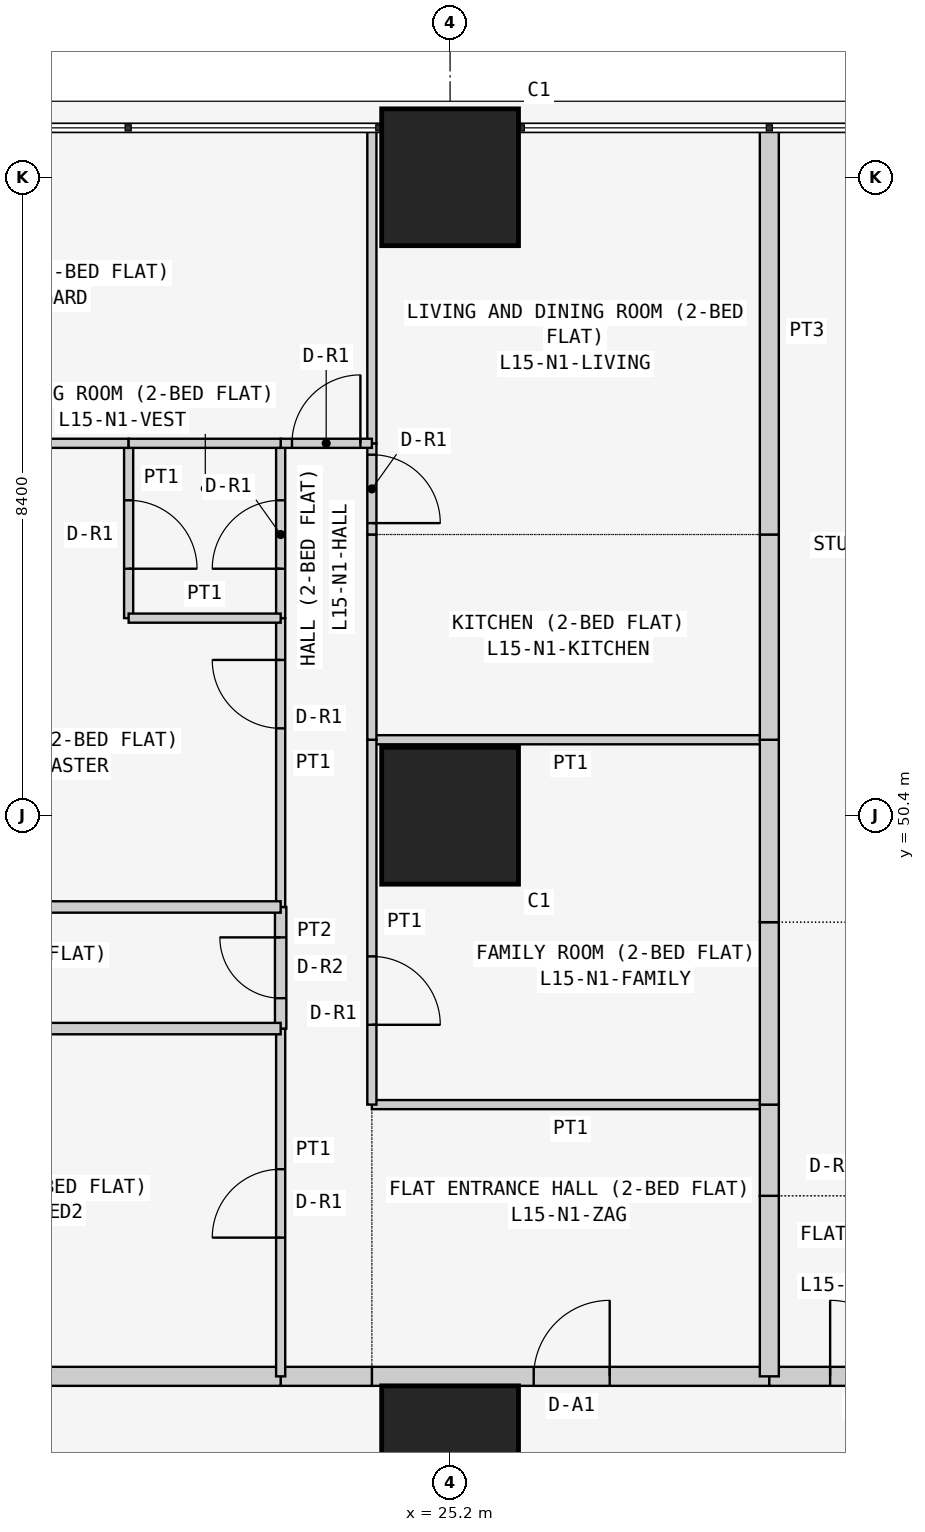
"""IFC4 building model, lengths in metres.
Left out: names, types, materials, properties, quantities, classifications, styles, units other than length and angle.
Written with IfcOpenShell. Run it as: python <this file> out.ifc"""

import sys

from ifc_helpers import new_model, si_unit, direction, frame, frame_2d, origin, origin_2d, place, context, subcontext, project, spatial, rectangle, extrude, element, fill, save


model = new_model("IFC4")
c1 = context("Model", 3, precision=1e-05, world=origin(), true_north=direction((0.0, 1.0)))
c2 = subcontext(c1, "Body", "Model", "MODEL_VIEW")
j1 = project(units=[si_unit("LENGTHUNIT", "METRE"), si_unit("PLANEANGLEUNIT", "RADIAN")], contexts=[c1])
p1 = place(None, origin())
s1 = spatial("IfcSite", under=j1, at=p1, CompositionType="ELEMENT")
p2 = place(p1, origin())
s2 = spatial("IfcBuilding", under=s1, at=p2, CompositionType="ELEMENT")
p3 = place(p2, frame((0.0, 0.0, 63.3)))
s3 = spatial("IfcBuildingStorey", under=s2, at=p3, CompositionType="ELEMENT", Elevation=63.3)
for number, where, z_axis, x_axis in (
    (1, (25.2, 42.0, 0.0), (0.0, 0.0, 1.0), (1.0, 0.0, 0.0)),
    (2, (25.2, 50.4, 0.0), (0.0, 0.0, 1.0), (1.0, 0.0, 0.0)),
    (3, (25.2, 58.8, 0.0), (0.0, 0.0, 1.0), (1.0, 0.0, 0.0)),
):
    element("IfcColumn", number, at=place(p3, frame(where, z_axis=z_axis, x_axis=x_axis)), inside=s3, PredefinedType="COLUMN", context=c2, shape_type="SweptSolid", body=[
        extrude(rectangle(XDim=1.8, YDim=1.8, at=origin_2d()), origin(), (0.0, 0.0, 1.0), 3.6),
    ])
p4 = place(p3, frame((24.171, 43.025, 0.0), z_axis=(0.0, 0.0, 1.0), x_axis=(1.0, 0.0, 0.0)))
e4 = element("IfcWall", 4, at=p4, inside=s3, PredefinedType="PARTITIONING", context=c2, shape_type="SweptSolid", body=[
    extrude(rectangle(XDim=5.229, YDim=0.25, at=frame_2d((2.615, 0.0))), origin(), (0.0, 0.0, 1.0), 3.45),
])
p5 = place(p4, frame((2.129, 0.0, 0.0)))
e5 = element("IfcOpeningElement", 5, at=p5, cuts=e4, PredefinedType="OPENING", context=c2, shape_type="SweptSolid", body=[
    extrude(rectangle(XDim=1.0, YDim=2.1, at=frame_2d((0.5, 1.05))), frame((0.0, 0.135, 0.0), z_axis=(0.0, -1.0, 0.0), x_axis=(1.0, 0.0, 0.0)), (0.0, 0.0, 1.0), 0.27),
])
p6 = place(p3, frame((22.971, 43.025, 0.0), z_axis=(0.0, 0.0, 1.0), x_axis=(1.0, 0.0, 0.0)))
e6 = element("IfcWall", 6, at=p6, inside=s3, PredefinedType="PARTITIONING", context=c2, shape_type="SweptSolid", body=[
    extrude(rectangle(XDim=1.2, YDim=0.25, at=frame_2d((0.6, 0.0))), origin(), (0.0, 0.0, 1.0), 3.45),
])
p7 = place(p3, frame((16.1, 43.025, 0.0), z_axis=(0.0, 0.0, 1.0), x_axis=(1.0, 0.0, 0.0)))
e7 = element("IfcWall", 7, at=p7, inside=s3, PredefinedType="PARTITIONING", context=c2, shape_type="SweptSolid", body=[
    extrude(rectangle(XDim=6.871, YDim=0.25, at=frame_2d((3.436, 0.0))), origin(), (0.0, 0.0, 1.0), 3.45),
])
p8 = place(p3, frame((29.4, 43.025, 0.0), z_axis=(0.0, 0.0, 1.0), x_axis=(1.0, 0.0, 0.0)))
e8 = element("IfcWall", 8, at=p8, inside=s3, PredefinedType="PARTITIONING", context=c2, shape_type="SweptSolid", body=[
    extrude(rectangle(XDim=2.6, YDim=0.25, at=frame_2d((1.3, 0.0))), origin(), (0.0, 0.0, 1.0), 3.45),
])
p9 = place(p8, frame((0.8, 0.0, 0.0)))
e9 = element("IfcOpeningElement", 9, at=p9, cuts=e8, PredefinedType="OPENING", context=c2, shape_type="SweptSolid", body=[
    extrude(rectangle(XDim=1.0, YDim=2.1, at=frame_2d((0.5, 1.05))), frame((0.0, 0.135, 0.0), z_axis=(0.0, -1.0, 0.0), x_axis=(1.0, 0.0, 0.0)), (0.0, 0.0, 1.0), 0.27),
])
p10 = place(p3, frame((29.4, 46.6, 0.0), z_axis=(0.0, 0.0, 1.0), x_axis=(-1.0, 0.0, 0.0)))
e10 = element("IfcWall", 10, at=p10, inside=s3, PredefinedType="PARTITIONING", context=c2, shape_type="SweptSolid", body=[
    extrude(rectangle(XDim=5.229, YDim=0.12, at=frame_2d((2.615, 0.0))), origin(), (0.0, 0.0, 1.0), 3.45),
])
p11 = place(p3, frame((29.4, 43.025, 0.0), z_axis=(0.0, 0.0, 1.0), x_axis=(0.0, 1.0, 0.0)))
e11 = element("IfcWall", 11, at=p11, inside=s3, PredefinedType="PARTITIONING", context=c2, shape_type="SweptSolid", body=[
    extrude(rectangle(XDim=2.375, YDim=0.25, at=frame_2d((1.188, 0.0))), origin(), (0.0, 0.0, 1.0), 2.848),
])
p12 = place(p3, frame((29.4, 45.4, 0.0), z_axis=(0.0, 0.0, 1.0), x_axis=(0.0, 1.0, 0.0)))
e12 = element("IfcWall", 12, at=p12, inside=s3, PredefinedType="PARTITIONING", context=c2, shape_type="SweptSolid", body=[
    extrude(rectangle(XDim=1.2, YDim=0.25, at=frame_2d((0.6, 0.0))), origin(), (0.0, 0.0, 1.0), 2.848),
])
p13 = place(p3, frame((29.4, 51.4, 0.0), z_axis=(0.0, 0.0, 1.0), x_axis=(-1.0, 0.0, 0.0)))
e13 = element("IfcWall", 13, at=p13, inside=s3, PredefinedType="PARTITIONING", context=c2, shape_type="SweptSolid", body=[
    extrude(rectangle(XDim=5.229, YDim=0.12, at=frame_2d((2.615, 0.0))), origin(), (0.0, 0.0, 1.0), 3.45),
])
p14 = place(p3, frame((24.171, 51.4, 0.0), z_axis=(0.0, 0.0, 1.0), x_axis=(0.0, -1.0, 0.0)))
e14 = element("IfcWall", 14, at=p14, inside=s3, PredefinedType="PARTITIONING", context=c2, shape_type="SweptSolid", body=[
    extrude(rectangle(XDim=4.8, YDim=0.12, at=frame_2d((2.4, 0.0))), origin(), (0.0, 0.0, 1.0), 3.45),
])
p15 = place(p14, frame((2.85, 0.0, 0.0)))
e15 = element("IfcOpeningElement", 15, at=p15, cuts=e14, PredefinedType="OPENING", context=c2, shape_type="SweptSolid", body=[
    extrude(rectangle(XDim=0.9, YDim=2.1, at=frame_2d((0.45, 1.05))), frame((0.0, 0.07, 0.0), z_axis=(0.0, -1.0, 0.0), x_axis=(1.0, 0.0, 0.0)), (0.0, 0.0, 1.0), 0.14),
])
for number, where, z_axis, x_axis in (
    (16, (29.4, 46.6, 0.0), (0.0, 0.0, 1.0), (0.0, 1.0, 0.0)),
    (17, (29.4, 49.0, 0.0), (0.0, 0.0, 1.0), (0.0, 1.0, 0.0)),
):
    element("IfcWall", number, at=place(p3, frame(where, z_axis=z_axis, x_axis=x_axis)), inside=s3, PredefinedType="PARTITIONING", context=c2, shape_type="SweptSolid", body=[
        extrude(rectangle(XDim=2.4, YDim=0.25, at=frame_2d((1.2, 0.0))), origin(), (0.0, 0.0, 1.0), 2.848),
    ])
p16 = place(p3, frame((24.171, 54.1, 0.0), z_axis=(0.0, 0.0, 1.0), x_axis=(0.0, -1.0, 0.0)))
e18 = element("IfcWall", 18, at=p16, inside=s3, PredefinedType="PARTITIONING", context=c2, shape_type="SweptSolid", body=[
    extrude(rectangle(XDim=2.7, YDim=0.12, at=frame_2d((1.35, 0.0))), origin(), (0.0, 0.0, 1.0), 3.45),
])
p17 = place(p3, frame((29.4, 51.4, 0.0), z_axis=(0.0, 0.0, 1.0), x_axis=(0.0, 1.0, 0.0)))
e19 = element("IfcWall", 19, at=p17, inside=s3, PredefinedType="PARTITIONING", context=c2, shape_type="SweptSolid", body=[
    extrude(rectangle(XDim=2.7, YDim=0.25, at=frame_2d((1.35, 0.0))), origin(), (0.0, 0.0, 1.0), 2.848),
])
p18 = place(p3, frame((24.171, 55.3, 0.0), z_axis=(0.0, 0.0, 1.0), x_axis=(0.0, -1.0, 0.0)))
e20 = element("IfcWall", 20, at=p18, inside=s3, PredefinedType="PARTITIONING", context=c2, shape_type="SweptSolid", body=[
    extrude(rectangle(XDim=1.2, YDim=0.12, at=frame_2d((0.6, 0.0))), origin(), (0.0, 0.0, 1.0), 3.45),
])
p19 = place(p18, frame((0.15, 0.0, 0.0)))
e21 = element("IfcOpeningElement", 21, at=p19, cuts=e20, PredefinedType="OPENING", context=c2, shape_type="SweptSolid", body=[
    extrude(rectangle(XDim=0.9, YDim=2.1, at=frame_2d((0.45, 1.05))), frame((0.0, 0.07, 0.0), z_axis=(0.0, -1.0, 0.0), x_axis=(1.0, 0.0, 0.0)), (0.0, 0.0, 1.0), 0.14),
])
p20 = place(p3, frame((24.171, 59.45, 0.0), z_axis=(0.0, 0.0, 1.0), x_axis=(0.0, -1.0, 0.0)))
e22 = element("IfcWall", 22, at=p20, inside=s3, PredefinedType="PARTITIONING", context=c2, shape_type="SweptSolid", body=[
    extrude(rectangle(XDim=4.15, YDim=0.12, at=frame_2d((2.075, 0.0))), origin(), (0.0, 0.0, 1.0), 3.45),
])
p21 = place(p3, frame((29.4, 54.1, 0.0), z_axis=(0.0, 0.0, 1.0), x_axis=(0.0, 1.0, 0.0)))
e23 = element("IfcWall", 23, at=p21, inside=s3, PredefinedType="PARTITIONING", context=c2, shape_type="SweptSolid", body=[
    extrude(rectangle(XDim=5.35, YDim=0.25, at=frame_2d((2.675, 0.0))), origin(), (0.0, 0.0, 1.0), 2.848),
])
p22 = place(p3, frame((22.971, 47.6, 0.0), z_axis=(0.0, 0.0, 1.0), x_axis=(0.0, -1.0, 0.0)))
e24 = element("IfcWall", 24, at=p22, inside=s3, PredefinedType="PARTITIONING", context=c2, shape_type="SweptSolid", body=[
    extrude(rectangle(XDim=4.575, YDim=0.12, at=frame_2d((2.288, 0.0))), origin(), (0.0, 0.0, 1.0), 3.45),
])
p23 = place(p22, frame((1.85, 0.0, 0.0)))
e25 = element("IfcOpeningElement", 25, at=p23, cuts=e24, PredefinedType="OPENING", context=c2, shape_type="SweptSolid", body=[
    extrude(rectangle(XDim=0.9, YDim=2.1, at=frame_2d((0.45, 1.05))), frame((0.0, 0.07, 0.0), z_axis=(0.0, -1.0, 0.0), x_axis=(1.0, 0.0, 0.0)), (0.0, 0.0, 1.0), 0.14),
])
p24 = place(p3, frame((22.971, 49.2, 0.0), z_axis=(0.0, 0.0, 1.0), x_axis=(0.0, -1.0, 0.0)))
e26 = element("IfcWall", 26, at=p24, inside=s3, PredefinedType="PARTITIONING", context=c2, shape_type="SweptSolid", body=[
    extrude(rectangle(XDim=1.6, YDim=0.15, at=frame_2d((0.8, 0.0))), origin(), (0.0, 0.0, 1.0), 3.45),
])
p25 = place(p24, frame((0.4, 0.0, 0.0)))
e27 = element("IfcOpeningElement", 27, at=p25, cuts=e26, PredefinedType="OPENING", context=c2, shape_type="SweptSolid", body=[
    extrude(rectangle(XDim=0.8, YDim=2.1, at=frame_2d((0.4, 1.05))), frame((0.0, 0.085, 0.0), z_axis=(0.0, -1.0, 0.0), x_axis=(1.0, 0.0, 0.0)), (0.0, 0.0, 1.0), 0.17),
])
p26 = place(p3, frame((22.971, 53.0, 0.0), z_axis=(0.0, 0.0, 1.0), x_axis=(0.0, -1.0, 0.0)))
e28 = element("IfcWall", 28, at=p26, inside=s3, PredefinedType="PARTITIONING", context=c2, shape_type="SweptSolid", body=[
    extrude(rectangle(XDim=3.8, YDim=0.12, at=frame_2d((1.9, 0.0))), origin(), (0.0, 0.0, 1.0), 3.45),
])
p27 = place(p26, frame((0.55, 0.0, 0.0)))
e29 = element("IfcOpeningElement", 29, at=p27, cuts=e28, PredefinedType="OPENING", context=c2, shape_type="SweptSolid", body=[
    extrude(rectangle(XDim=0.9, YDim=2.1, at=frame_2d((0.45, 1.05))), frame((0.0, 0.07, 0.0), z_axis=(0.0, -1.0, 0.0), x_axis=(1.0, 0.0, 0.0)), (0.0, 0.0, 1.0), 0.14),
])
p28 = place(p3, frame((22.971, 55.3, 0.0), z_axis=(0.0, 0.0, 1.0), x_axis=(0.0, -1.0, 0.0)))
e30 = element("IfcWall", 30, at=p28, inside=s3, PredefinedType="PARTITIONING", context=c2, shape_type="SweptSolid", body=[
    extrude(rectangle(XDim=2.3, YDim=0.12, at=frame_2d((1.15, 0.0))), origin(), (0.0, 0.0, 1.0), 3.45),
])
p29 = place(p28, frame((0.75, 0.0, 0.0)))
e31 = element("IfcOpeningElement", 31, at=p29, cuts=e30, PredefinedType="OPENING", context=c2, shape_type="SweptSolid", body=[
    extrude(rectangle(XDim=0.9, YDim=2.1, at=frame_2d((0.45, 1.05))), frame((0.0, 0.07, 0.0), z_axis=(0.0, -1.0, 0.0), x_axis=(1.0, 0.0, 0.0)), (0.0, 0.0, 1.0), 0.14),
])
p30 = place(p3, frame((24.171, 55.3, 0.0), z_axis=(0.0, 0.0, 1.0), x_axis=(-1.0, 0.0, 0.0)))
e32 = element("IfcWall", 32, at=p30, inside=s3, PredefinedType="PARTITIONING", context=c2, shape_type="SweptSolid", body=[
    extrude(rectangle(XDim=1.2, YDim=0.12, at=frame_2d((0.6, 0.0))), origin(), (0.0, 0.0, 1.0), 3.45),
])
p31 = place(p30, frame((0.151, 0.0, 0.0)))
e33 = element("IfcOpeningElement", 33, at=p31, cuts=e32, PredefinedType="OPENING", context=c2, shape_type="SweptSolid", body=[
    extrude(rectangle(XDim=0.9, YDim=2.1, at=frame_2d((0.45, 1.05))), frame((0.0, 0.07, 0.0), z_axis=(0.0, -1.0, 0.0), x_axis=(1.0, 0.0, 0.0)), (0.0, 0.0, 1.0), 0.14),
])
for number, where, z_axis, x_axis in (
    (34, (22.971, 47.6, 0.0), (0.0, 0.0, 1.0), (-1.0, 0.0, 0.0)),
    (35, (22.971, 49.2, 0.0), (0.0, 0.0, 1.0), (-1.0, 0.0, 0.0)),
):
    element("IfcWall", number, at=place(p3, frame(where, z_axis=z_axis, x_axis=x_axis)), inside=s3, PredefinedType="PARTITIONING", context=c2, shape_type="SweptSolid", body=[
        extrude(rectangle(XDim=6.871, YDim=0.15, at=frame_2d((3.436, 0.0))), origin(), (0.0, 0.0, 1.0), 3.45),
    ])
p32 = place(p3, frame((20.971, 55.3, 0.0), z_axis=(0.0, 0.0, 1.0), x_axis=(0.0, -1.0, 0.0)))
e36 = element("IfcWall", 36, at=p32, inside=s3, PredefinedType="PARTITIONING", context=c2, shape_type="SweptSolid", body=[
    extrude(rectangle(XDim=2.3, YDim=0.12, at=frame_2d((1.15, 0.0))), origin(), (0.0, 0.0, 1.0), 2.848),
])
p33 = place(p32, frame((0.75, 0.0, 0.0)))
e37 = element("IfcOpeningElement", 37, at=p33, cuts=e36, PredefinedType="OPENING", context=c2, shape_type="SweptSolid", body=[
    extrude(rectangle(XDim=0.9, YDim=2.1, at=frame_2d((0.45, 1.05))), frame((0.0, 0.07, 0.0), z_axis=(0.0, -1.0, 0.0), x_axis=(1.0, 0.0, 0.0)), (0.0, 0.0, 1.0), 0.14),
])
p34 = place(p3, frame((20.971, 53.0, 0.0), z_axis=(0.0, 0.0, 1.0), x_axis=(1.0, 0.0, 0.0)))
e38 = element("IfcWall", 38, at=p34, inside=s3, PredefinedType="PARTITIONING", context=c2, shape_type="SweptSolid", body=[
    extrude(rectangle(XDim=2.0, YDim=0.12, at=frame_2d((1.0, 0.0))), origin(), (0.0, 0.0, 1.0), 3.45),
])
p35 = place(p3, frame((16.1, 55.3, 0.0), z_axis=(0.0, 0.0, 1.0), x_axis=(1.0, 0.0, 0.0)))
e39 = element("IfcWall", 39, at=p35, inside=s3, PredefinedType="PARTITIONING", context=c2, shape_type="SweptSolid", body=[
    extrude(rectangle(XDim=4.871, YDim=0.12, at=frame_2d((2.436, 0.0))), origin(), (0.0, 0.0, 1.0), 3.45),
])
p36 = place(p3, frame((22.971, 55.3, 0.0), z_axis=(0.0, 0.0, 1.0), x_axis=(-1.0, 0.0, 0.0)))
e40 = element("IfcWall", 40, at=p36, inside=s3, PredefinedType="PARTITIONING", context=c2, shape_type="SweptSolid", body=[
    extrude(rectangle(XDim=2.0, YDim=0.12, at=frame_2d((1.0, 0.0))), origin(), (0.0, 0.0, 1.0), 3.45),
])
p37 = place(p5, origin())
e41 = element("IfcDoor", 41, at=p37, inside=s3, OperationType="SINGLE_SWING_RIGHT", PredefinedType="DOOR", context=c2, shape_type="SweptSolid", body=[
    extrude(rectangle(XDim=1.0, YDim=2.1, at=frame_2d((0.5, 1.05))), frame((0.0, 0.025, 0.0), z_axis=(0.0, -1.0, 0.0), x_axis=(1.0, 0.0, 0.0)), (0.0, 0.0, 1.0), 0.05),
])
fill(e5, e41)
p38 = place(p15, origin())
e42 = element("IfcDoor", 42, at=p38, inside=s3, OperationType="SINGLE_SWING_RIGHT", PredefinedType="DOOR", context=c2, shape_type="SweptSolid", body=[
    extrude(rectangle(XDim=0.9, YDim=2.1, at=frame_2d((0.45, 1.05))), frame((0.0, 0.025, 0.0), z_axis=(0.0, -1.0, 0.0), x_axis=(1.0, 0.0, 0.0)), (0.0, 0.0, 1.0), 0.05),
])
fill(e15, e42)
p39 = place(p19, origin())
e43 = element("IfcDoor", 43, at=p39, inside=s3, OperationType="SINGLE_SWING_RIGHT", PredefinedType="DOOR", context=c2, shape_type="SweptSolid", body=[
    extrude(rectangle(XDim=0.9, YDim=2.1, at=frame_2d((0.45, 1.05))), frame((0.0, 0.025, 0.0), z_axis=(0.0, -1.0, 0.0), x_axis=(1.0, 0.0, 0.0)), (0.0, 0.0, 1.0), 0.05),
])
fill(e21, e43)
p40 = place(p23, frame((0.9, 0.0, 0.0), z_axis=(0.0, 0.0, 1.0), x_axis=(-1.0, 0.0, 0.0)))
e44 = element("IfcDoor", 44, at=p40, inside=s3, OperationType="SINGLE_SWING_LEFT", PredefinedType="DOOR", context=c2, shape_type="SweptSolid", body=[
    extrude(rectangle(XDim=0.9, YDim=2.1, at=frame_2d((0.45, 1.05))), frame((0.0, 0.025, 0.0), z_axis=(0.0, -1.0, 0.0), x_axis=(1.0, 0.0, 0.0)), (0.0, 0.0, 1.0), 0.05),
])
fill(e25, e44)
p41 = place(p25, frame((0.8, 0.0, 0.0), z_axis=(0.0, 0.0, 1.0), x_axis=(-1.0, 0.0, 0.0)))
e45 = element("IfcDoor", 45, at=p41, inside=s3, OperationType="SINGLE_SWING_RIGHT", PredefinedType="DOOR", context=c2, shape_type="SweptSolid", body=[
    extrude(rectangle(XDim=0.8, YDim=2.1, at=frame_2d((0.4, 1.05))), frame((0.0, 0.025, 0.0), z_axis=(0.0, -1.0, 0.0), x_axis=(1.0, 0.0, 0.0)), (0.0, 0.0, 1.0), 0.05),
])
fill(e27, e45)
p42 = place(p27, frame((0.9, 0.0, 0.0), z_axis=(0.0, 0.0, 1.0), x_axis=(-1.0, 0.0, 0.0)))
e46 = element("IfcDoor", 46, at=p42, inside=s3, OperationType="SINGLE_SWING_RIGHT", PredefinedType="DOOR", context=c2, shape_type="SweptSolid", body=[
    extrude(rectangle(XDim=0.9, YDim=2.1, at=frame_2d((0.45, 1.05))), frame((0.0, 0.025, 0.0), z_axis=(0.0, -1.0, 0.0), x_axis=(1.0, 0.0, 0.0)), (0.0, 0.0, 1.0), 0.05),
])
fill(e29, e46)
p43 = place(p29, frame((0.9, 0.0, 0.0), z_axis=(0.0, 0.0, 1.0), x_axis=(-1.0, 0.0, 0.0)))
e47 = element("IfcDoor", 47, at=p43, inside=s3, OperationType="SINGLE_SWING_LEFT", PredefinedType="DOOR", context=c2, shape_type="SweptSolid", body=[
    extrude(rectangle(XDim=0.9, YDim=2.1, at=frame_2d((0.45, 1.05))), frame((0.0, 0.025, 0.0), z_axis=(0.0, -1.0, 0.0), x_axis=(1.0, 0.0, 0.0)), (0.0, 0.0, 1.0), 0.05),
])
fill(e31, e47)
p44 = place(p33, origin())
e48 = element("IfcDoor", 48, at=p44, inside=s3, OperationType="SINGLE_SWING_RIGHT", PredefinedType="DOOR", context=c2, shape_type="SweptSolid", body=[
    extrude(rectangle(XDim=0.9, YDim=2.1, at=frame_2d((0.45, 1.05))), frame((0.0, 0.025, 0.0), z_axis=(0.0, -1.0, 0.0), x_axis=(1.0, 0.0, 0.0)), (0.0, 0.0, 1.0), 0.05),
])
fill(e37, e48)
p45 = place(p31, frame((0.9, 0.0, 0.0), z_axis=(0.0, 0.0, 1.0), x_axis=(-1.0, 0.0, 0.0)))
e49 = element("IfcDoor", 49, at=p45, inside=s3, OperationType="SINGLE_SWING_RIGHT", PredefinedType="DOOR", context=c2, shape_type="SweptSolid", body=[
    extrude(rectangle(XDim=0.9, YDim=2.1, at=frame_2d((0.45, 1.05))), frame((0.0, 0.025, 0.0), z_axis=(0.0, -1.0, 0.0), x_axis=(1.0, 0.0, 0.0)), (0.0, 0.0, 1.0), 0.05),
])
fill(e33, e49)
p46 = place(p9, origin())
e50 = element("IfcDoor", 50, at=p46, inside=s3, OperationType="SINGLE_SWING_LEFT", PredefinedType="DOOR", context=c2, shape_type="SweptSolid", body=[
    extrude(rectangle(XDim=1.0, YDim=2.1, at=frame_2d((0.5, 1.05))), frame((0.0, 0.025, 0.0), z_axis=(0.0, -1.0, 0.0), x_axis=(1.0, 0.0, 0.0)), (0.0, 0.0, 1.0), 0.05),
])
fill(e9, e50)
save(model, sys.argv[1])
